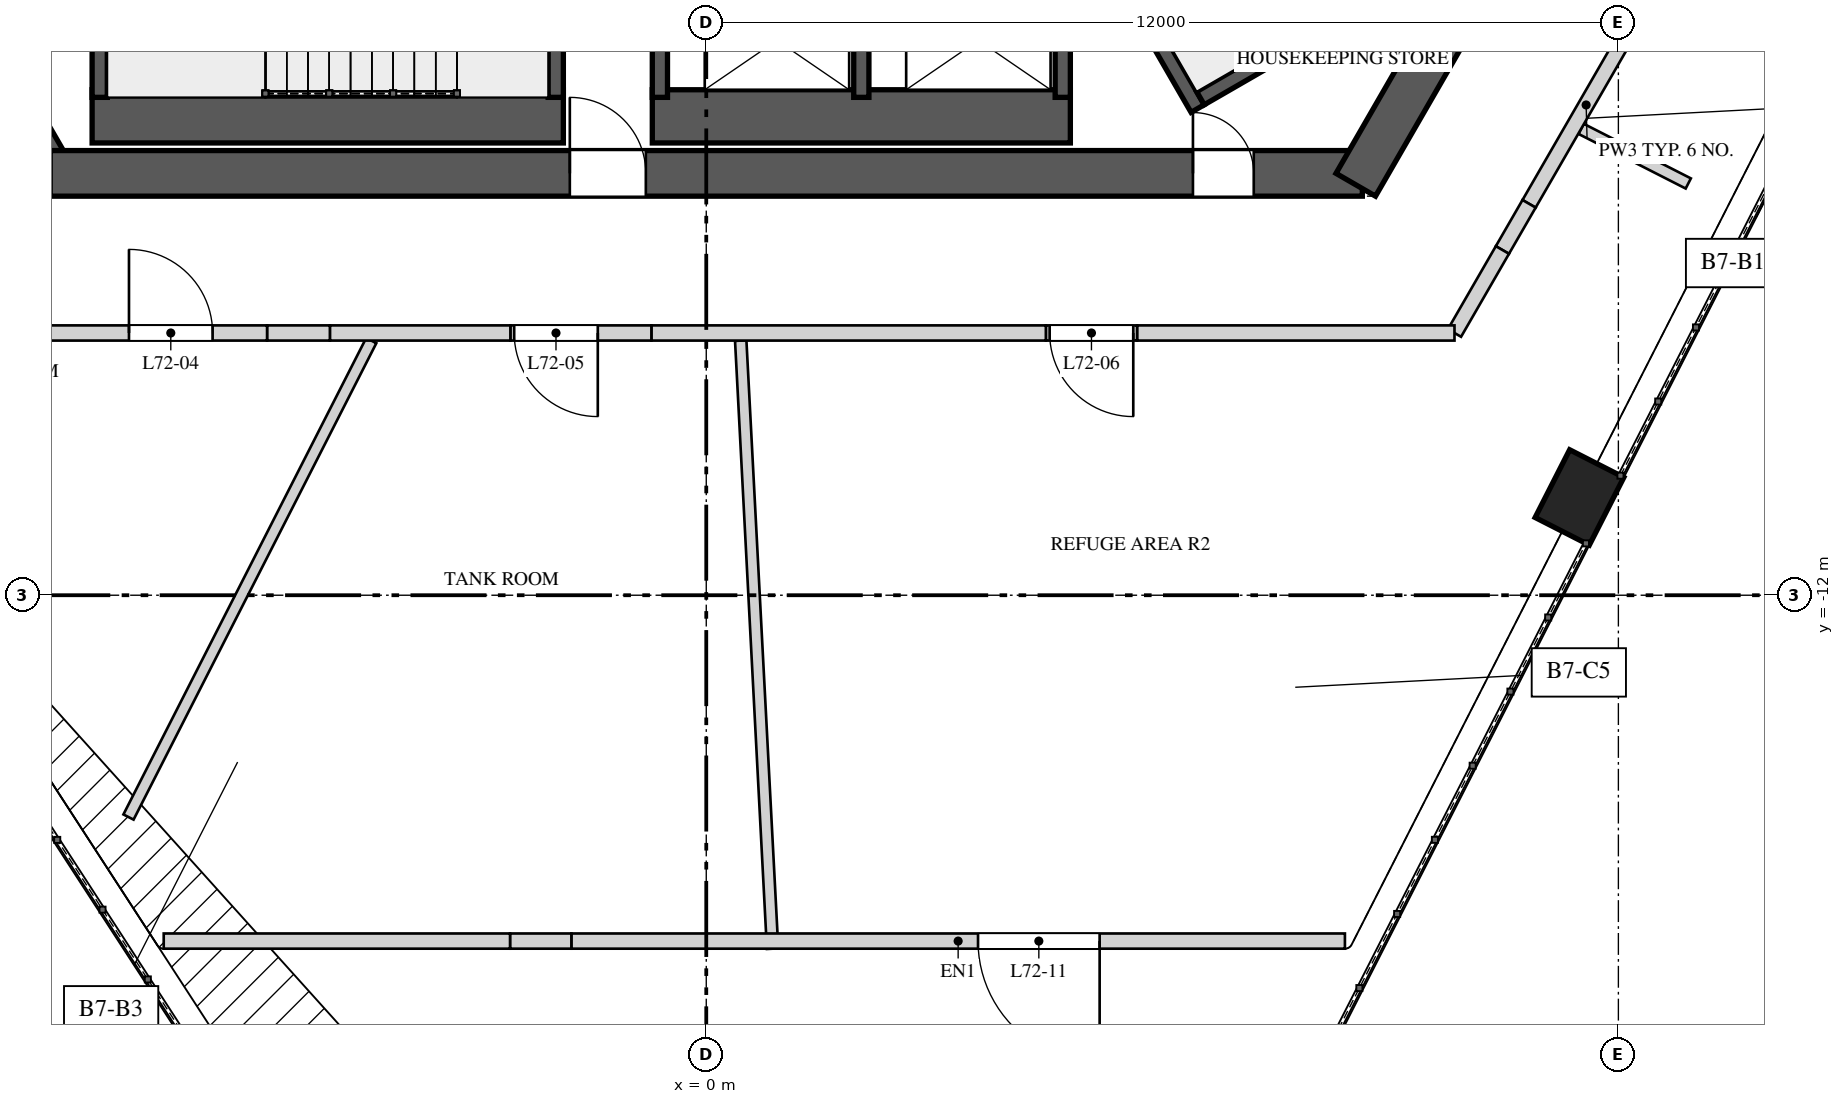
"""IFC4 building model, lengths in metres.
Left out: names, types, materials, properties, quantities, classifications, styles, units other than length and angle.
Written with IfcOpenShell. Run it as: python <this file> out.ifc"""

import sys

from ifc_helpers import new_model, si_unit, direction, frame, frame_2d, origin, origin_2d, place, context, subcontext, project, spatial, polyline, rectangle, outline, extrude, element, fill, save


model = new_model("IFC4")
c1 = context("Model", 3, precision=1e-05, world=origin(), true_north=direction((0.0, 1.0)))
c2 = subcontext(c1, "Body", "Model", "MODEL_VIEW")
j1 = project(units=[si_unit("LENGTHUNIT", "METRE"), si_unit("PLANEANGLEUNIT", "RADIAN")], contexts=[c1])
p1 = place(None, origin())
s1 = spatial("IfcSite", under=j1, at=p1, CompositionType="ELEMENT")
p2 = place(p1, origin())
s2 = spatial("IfcBuilding", under=s1, at=p2, CompositionType="ELEMENT")
p3 = place(p2, frame((0.0, 0.0, 306.4)))
s3 = spatial("IfcBuildingStorey", under=s2, at=p3, CompositionType="ELEMENT", Elevation=306.4)
p4 = place(p3, frame((-9.988, -4.1, 0.0), z_axis=(0.0, 0.0, 1.0), x_axis=(0.499995765644, -0.866027848477, 0.0)))
e1 = element("IfcWall", 1, at=p4, inside=s3, PredefinedType="SHEAR", context=c2, shape_type="SweptSolid", body=[
    extrude(rectangle(XDim=2.887, YDim=0.6, at=frame_2d((1.443, 0.0))), origin(), (0.0, 0.0, 1.0), 14.0),
])
p5 = place(p3, frame((-8.631, -6.45, 0.0), z_axis=(0.0, 0.0, 1.0), x_axis=(1.0, 0.0, 0.0)))
e2 = element("IfcWall", 2, at=p5, inside=s3, PredefinedType="SHEAR", context=c2, shape_type="SweptSolid", body=[
    extrude(rectangle(XDim=17.263, YDim=0.6, at=frame_2d((8.631, 0.0))), origin(), (0.0, 0.0, 1.0), 14.0),
])
p6 = place(p5, frame((6.836, 0.0, 0.0)))
e3 = element("IfcOpeningElement", 3, at=p6, cuts=e2, PredefinedType="OPENING", context=c2, shape_type="SweptSolid", body=[
    extrude(rectangle(XDim=1.0, YDim=2.4, at=frame_2d((0.5, 1.2))), frame((0.0, 0.31, 0.0), z_axis=(0.0, -1.0, 0.0), x_axis=(1.0, 0.0, 0.0)), (0.0, 0.0, 1.0), 0.62),
])
p7 = place(p5, frame((15.034, 0.0, 0.0)))
e4 = element("IfcOpeningElement", 4, at=p7, cuts=e2, PredefinedType="OPENING", context=c2, shape_type="SweptSolid", body=[
    extrude(rectangle(XDim=0.8, YDim=2.1, at=frame_2d((0.4, 1.05))), frame((0.0, 0.31, 0.0), z_axis=(0.0, -1.0, 0.0), x_axis=(1.0, 0.0, 0.0)), (0.0, 0.0, 1.0), 0.62),
])
p8 = place(p3, frame((8.545, -6.6, 0.0), z_axis=(0.0, 0.0, 1.0), x_axis=(0.499995765644, 0.866027848477, 0.0)))
e5 = element("IfcWall", 5, at=p8, inside=s3, PredefinedType="SHEAR", context=c2, shape_type="SweptSolid", body=[
    extrude(rectangle(XDim=2.887, YDim=0.6, at=frame_2d((1.443, 0.0))), origin(), (0.0, 0.0, 1.0), 14.0),
])
p9 = place(p3, frame((11.488, -10.713, 0.0), z_axis=(0.0, 0.0, 1.0), x_axis=(0.45399049974, 0.891006524188, 0.0)))
e6 = element("IfcColumn", 6, at=p9, inside=s3, PredefinedType="COLUMN", context=c2, shape_type="SweptSolid", body=[
    extrude(rectangle(XDim=1.0, YDim=0.8, at=origin_2d()), origin(), (0.0, 0.0, 1.0), 9.037),
])
p10 = place(p3, frame((-8.08, -5.7, 0.0), z_axis=(0.0, 0.0, 1.0), x_axis=(1.0, 0.0, 0.0)))
e7 = element("IfcWall", 7, at=p10, inside=s3, PredefinedType="SOLIDWALL", context=c2, shape_type="SweptSolid", body=[
    extrude(rectangle(XDim=6.2, YDim=0.7, at=frame_2d((3.1, 0.0))), origin(), (0.0, 0.0, 1.0), 13.65),
])
p11 = place(p3, frame((-7.98, -2.9, 0.0), z_axis=(0.0, 0.0, 1.0), x_axis=(0.0, -1.0, 0.0)))
e8 = element("IfcWall", 8, at=p11, inside=s3, PredefinedType="SOLIDWALL", context=c2, shape_type="SweptSolid", body=[
    extrude(rectangle(XDim=2.55, YDim=0.2, at=frame_2d((1.275, 0.0))), origin(), (0.0, 0.0, 1.0), 13.65),
])
p12 = place(p3, frame((-1.98, -2.9, 0.0), z_axis=(0.0, 0.0, 1.0), x_axis=(0.0, -1.0, 0.0)))
e9 = element("IfcWall", 9, at=p12, inside=s3, PredefinedType="SOLIDWALL", context=c2, shape_type="SweptSolid", body=[
    extrude(rectangle(XDim=2.55, YDim=0.2, at=frame_2d((1.275, 0.0))), origin(), (0.0, 0.0, 1.0), 13.65),
])
p13 = place(p12, frame((0.725, 0.0, 0.0)))
e10 = element("IfcOpeningElement", 10, at=p13, cuts=e9, PredefinedType="OPENING", context=c2, shape_type="SweptSolid", body=[
    extrude(rectangle(XDim=1.1, YDim=2.4, at=frame_2d((0.55, 1.2))), frame((0.0, 0.11, 0.0), z_axis=(0.0, -1.0, 0.0), x_axis=(1.0, 0.0, 0.0)), (0.0, 0.0, 1.0), 0.22),
])
p14 = place(p3, frame((6.465, -5.597, 0.0), z_axis=(0.0, 0.0, 1.0), x_axis=(-0.49998037582, 0.866036733513, 0.0)))
e11 = element("IfcWall", 11, at=p14, inside=s3, PredefinedType="SOLIDWALL", context=c2, shape_type="SweptSolid", body=[
    extrude(rectangle(XDim=6.2, YDim=0.2, at=frame_2d((3.1, 0.0))), origin(), (0.0, 0.0, 1.0), 13.65),
])
p15 = place(p3, frame((6.501, -5.461, 0.0), z_axis=(0.0, 0.0, 1.0), x_axis=(0.865989465428, 0.500062241894, 0.0)))
e12 = element("IfcWall", 12, at=p15, inside=s3, PredefinedType="SOLIDWALL", context=c2, shape_type="SweptSolid", body=[
    extrude(rectangle(XDim=2.55, YDim=0.2, at=frame_2d((1.275, 0.0))), origin(), (0.0, 0.0, 1.0), 13.65),
])
p16 = place(p3, frame((-0.71, -5.7, 0.0), z_axis=(0.0, 0.0, 1.0), x_axis=(1.0, 0.0, 0.0)))
e13 = element("IfcWall", 13, at=p16, inside=s3, PredefinedType="SOLIDWALL", context=c2, shape_type="SweptSolid", body=[
    extrude(rectangle(XDim=5.5, YDim=0.7, at=frame_2d((2.75, 0.0))), origin(), (0.0, 0.0, 1.0), 13.65),
])
for number, where, z_axis, x_axis in (
    (14, (-0.61, -3.9, 0.0), (0.0, 0.0, 1.0), (0.0, -1.0, 0.0)),
    (15, (2.04, -3.9, 0.0), (0.0, 0.0, 1.0), (0.0, -1.0, 0.0)),
    (16, (4.69, -3.9, 0.0), (0.0, 0.0, 1.0), (0.0, -1.0, 0.0)),
):
    element("IfcWall", number, at=place(p3, frame(where, z_axis=z_axis, x_axis=x_axis)), inside=s3, PredefinedType="SOLIDWALL", context=c2, shape_type="SweptSolid", body=[
        extrude(rectangle(XDim=1.55, YDim=0.2, at=frame_2d((0.775, 0.0))), origin(), (0.0, 0.0, 1.0), 13.65),
    ])
p17 = place(p3, frame((-4.407, -8.65, 0.0), z_axis=(0.0, 0.0, 1.0), x_axis=(-0.454002721832, -0.891000296615, 0.0)))
e17 = element("IfcWall", 17, at=p17, inside=s3, PredefinedType="PARTITIONING", context=c2, shape_type="SweptSolid", body=[
    extrude(rectangle(XDim=7.035, YDim=0.15, at=frame_2d((3.518, 0.0))), origin(), (0.0, 0.0, 1.0), 13.65),
])
p18 = place(p3, frame((0.453, -8.65, 0.0), z_axis=(0.0, 0.0, 1.0), x_axis=(0.052326895947, -0.998630009543, 0.0)))
e18 = element("IfcWall", 18, at=p18, inside=s3, PredefinedType="PARTITIONING", context=c2, shape_type="SweptSolid", body=[
    extrude(rectangle(XDim=8.011, YDim=0.15, at=frame_2d((4.005, 0.0))), origin(), (0.0, 0.0, 1.0), 13.65),
])
p19 = place(p3, frame((11.51, -5.865, 0.0), z_axis=(0.0, 0.0, 1.0), x_axis=(0.891006520779, -0.453990506431, 0.0)))
e19 = element("IfcWall", 19, at=p19, inside=s3, PredefinedType="PARTITIONING", context=c2, shape_type="SweptSolid", body=[
    extrude(rectangle(XDim=1.582, YDim=0.15, at=frame_2d((0.791, 0.0))), origin(), (0.0, 0.0, 1.0), 13.65),
])
p20 = place(p3, frame((12.326, -4.25, 0.0), z_axis=(0.0, 0.0, 1.0), x_axis=(-0.500003959331, -0.866023117852, 0.0)))
e20 = element("IfcWall", 20, at=p20, inside=s3, PredefinedType="SOLIDWALL", context=c2, shape_type="SweptSolid", body=[
    extrude(rectangle(XDim=3.003, YDim=0.2, at=frame_2d((1.501, 0.0))), origin(), (0.0, 0.0, 1.0), 13.65),
])
p21 = place(p3, frame((10.825, -6.851, 0.0), z_axis=(0.0, 0.0, 1.0), x_axis=(-0.500144223137, -0.865942120504, 0.0)))
e21 = element("IfcWall", 21, at=p21, inside=s3, PredefinedType="SOLIDWALL", context=c2, shape_type="SweptSolid", body=[
    extrude(rectangle(XDim=0.701, YDim=0.2, at=frame_2d((0.351, 0.0))), origin(), (0.0, 0.0, 1.0), 12.95),
])
p22 = place(p3, frame((10.474, -7.458, 0.0), z_axis=(0.0, 0.0, 1.0), x_axis=(-0.499929168788, -0.866066294342, 0.0)))
e22 = element("IfcWall", 22, at=p22, inside=s3, PredefinedType="SOLIDWALL", context=c2, shape_type="SweptSolid", body=[
    extrude(rectangle(XDim=1.261, YDim=0.2, at=frame_2d((0.63, 0.0))), origin(), (0.0, 0.0, 1.0), 13.65),
])
p23 = place(p3, frame((9.844, -8.55, 0.0), z_axis=(0.0, 0.0, 1.0), x_axis=(-1.0, 0.0, 0.0)))
e23 = element("IfcWall", 23, at=p23, inside=s3, PredefinedType="SOLIDWALL", context=c2, shape_type="SweptSolid", body=[
    extrude(rectangle(XDim=4.176, YDim=0.2, at=frame_2d((2.088, 0.0))), origin(), (0.0, 0.0, 1.0), 13.65),
])
p24 = place(p3, frame((5.668, -8.55, 0.0), z_axis=(0.0, 0.0, 1.0), x_axis=(-1.0, 0.0, 0.0)))
e24 = element("IfcWall", 24, at=p24, inside=s3, PredefinedType="SOLIDWALL", context=c2, shape_type="SweptSolid", body=[
    extrude(outline(polyline([(0.0, 0.0), (1.2, 0.0), (1.2, 13.65), (0.839, 13.65), (0.839, 12.95), (0.0, 12.95), (0.0, 0.0)])), frame((0.0, 0.1, 0.0), z_axis=(0.0, -1.0, 0.0), x_axis=(1.0, 0.0, 0.0)), (0.0, 0.0, 1.0), 0.2),
])
p25 = place(p24, frame((0.05, 0.0, 0.0)))
e25 = element("IfcOpeningElement", 25, at=p25, cuts=e24, PredefinedType="OPENING", context=c2, shape_type="SweptSolid", body=[
    extrude(rectangle(XDim=1.1, YDim=2.2, at=frame_2d((0.55, 1.1))), frame((0.0, 0.11, 0.0), z_axis=(0.0, -1.0, 0.0), x_axis=(1.0, 0.0, 0.0)), (0.0, 0.0, 1.0), 0.22),
])
p26 = place(p3, frame((4.468, -8.55, 0.0), z_axis=(0.0, 0.0, 1.0), x_axis=(-1.0, 0.0, 0.0)))
e26 = element("IfcWall", 26, at=p26, inside=s3, PredefinedType="SOLIDWALL", context=c2, shape_type="SweptSolid", body=[
    extrude(rectangle(XDim=5.189, YDim=0.2, at=frame_2d((2.595, 0.0))), origin(), (0.0, 0.0, 1.0), 13.65),
])
p27 = place(p3, frame((-0.722, -8.55, 0.0), z_axis=(0.0, 0.0, 1.0), x_axis=(-1.0, 0.0, 0.0)))
e27 = element("IfcWall", 27, at=p27, inside=s3, PredefinedType="SOLIDWALL", context=c2, shape_type="SweptSolid", body=[
    extrude(outline(polyline([(0.0, 0.0), (1.855, 0.0), (1.855, 13.65), (0.807, 13.65), (0.807, 12.75), (0.0, 12.75), (0.0, 0.0)])), frame((0.0, 0.1, 0.0), z_axis=(0.0, -1.0, 0.0), x_axis=(1.0, 0.0, 0.0)), (0.0, 0.0, 1.0), 0.2),
])
p28 = place(p27, frame((0.705, 0.0, 0.0)))
e28 = element("IfcOpeningElement", 28, at=p28, cuts=e27, PredefinedType="OPENING", context=c2, shape_type="SweptSolid", body=[
    extrude(rectangle(XDim=1.1, YDim=2.2, at=frame_2d((0.55, 1.1))), frame((0.0, 0.11, 0.0), z_axis=(0.0, -1.0, 0.0), x_axis=(1.0, 0.0, 0.0)), (0.0, 0.0, 1.0), 0.22),
])
p29 = place(p3, frame((-2.577, -8.55, 0.0), z_axis=(0.0, 0.0, 1.0), x_axis=(-1.0, 0.0, 0.0)))
e29 = element("IfcWall", 29, at=p29, inside=s3, PredefinedType="SOLIDWALL", context=c2, shape_type="SweptSolid", body=[
    extrude(rectangle(XDim=2.375, YDim=0.2, at=frame_2d((1.188, 0.0))), origin(), (0.0, 0.0, 1.0), 13.65),
])
p30 = place(p3, frame((-4.952, -8.55, 0.0), z_axis=(0.0, 0.0, 1.0), x_axis=(-1.0, 0.0, 0.0)))
e30 = element("IfcWall", 30, at=p30, inside=s3, PredefinedType="SOLIDWALL", context=c2, shape_type="SweptSolid", body=[
    extrude(rectangle(XDim=0.826, YDim=0.2, at=frame_2d((0.413, 0.0))), origin(), (0.0, 0.0, 1.0), 12.95),
])
p31 = place(p3, frame((-9.844, -8.55, 0.0), z_axis=(0.0, 0.0, 1.0), x_axis=(1.0, 0.0, 0.0)))
e31 = element("IfcWall", 31, at=p31, inside=s3, PredefinedType="SOLIDWALL", context=c2, shape_type="SweptSolid", body=[
    extrude(rectangle(XDim=4.066, YDim=0.2, at=frame_2d((2.033, 0.0))), origin(), (0.0, 0.0, 1.0), 13.65),
])
p32 = place(p31, frame((2.249, 0.0, 0.0)))
e32 = element("IfcOpeningElement", 32, at=p32, cuts=e31, PredefinedType="OPENING", context=c2, shape_type="SweptSolid", body=[
    extrude(rectangle(XDim=1.1, YDim=2.2, at=frame_2d((0.55, 1.1))), frame((0.0, 0.11, 0.0), z_axis=(0.0, -1.0, 0.0), x_axis=(1.0, 0.0, 0.0)), (0.0, 0.0, 1.0), 0.22),
])
p33 = place(p3, frame((8.402, -16.55, 0.0), z_axis=(0.0, 0.0, 1.0), x_axis=(-1.0, 0.0, 0.0)))
e33 = element("IfcWall", 33, at=p33, inside=s3, PredefinedType="SOLIDWALL", context=c2, shape_type="SweptSolid", body=[
    extrude(rectangle(XDim=10.177, YDim=0.2, at=frame_2d((5.088, 0.0))), origin(), (0.0, 0.0, 1.0), 13.65),
])
p34 = place(p33, frame((3.227, 0.0, 0.0)))
e34 = element("IfcOpeningElement", 34, at=p34, cuts=e33, PredefinedType="OPENING", context=c2, shape_type="SweptSolid", body=[
    extrude(rectangle(XDim=1.6, YDim=2.3, at=frame_2d((0.8, 1.15))), frame((0.0, 0.11, 0.0), z_axis=(0.0, -1.0, 0.0), x_axis=(1.0, 0.0, 0.0)), (0.0, 0.0, 1.0), 0.22),
])
p35 = place(p3, frame((-1.775, -16.55, 0.0), z_axis=(0.0, 0.0, 1.0), x_axis=(-1.0, 0.0, 0.0)))
e35 = element("IfcWall", 35, at=p35, inside=s3, PredefinedType="SOLIDWALL", context=c2, shape_type="SweptSolid", body=[
    extrude(rectangle(XDim=0.807, YDim=0.2, at=frame_2d((0.403, 0.0))), origin(), (0.0, 0.0, 1.0), 12.75),
])
p36 = place(p3, frame((-2.582, -16.55, 0.0), z_axis=(0.0, 0.0, 1.0), x_axis=(-1.0, 0.0, 0.0)))
e36 = element("IfcWall", 36, at=p36, inside=s3, PredefinedType="SOLIDWALL", context=c2, shape_type="SweptSolid", body=[
    extrude(rectangle(XDim=4.556, YDim=0.2, at=frame_2d((2.278, 0.0))), origin(), (0.0, 0.0, 1.0), 13.65),
])
p37 = place(p6, origin())
e37 = element("IfcDoor", 37, at=p37, inside=s3, OperationType="SINGLE_SWING_LEFT", PredefinedType="DOOR", context=c2, shape_type="SweptSolid", body=[
    extrude(rectangle(XDim=1.0, YDim=2.4, at=frame_2d((0.5, 1.2))), frame((0.0, 0.025, 0.0), z_axis=(0.0, -1.0, 0.0), x_axis=(1.0, 0.0, 0.0)), (0.0, 0.0, 1.0), 0.05),
])
fill(e3, e37)
p38 = place(p7, origin())
e38 = element("IfcDoor", 38, at=p38, inside=s3, OperationType="SINGLE_SWING_LEFT", PredefinedType="DOOR", context=c2, shape_type="SweptSolid", body=[
    extrude(rectangle(XDim=0.8, YDim=2.1, at=frame_2d((0.4, 1.05))), frame((0.0, 0.025, 0.0), z_axis=(0.0, -1.0, 0.0), x_axis=(1.0, 0.0, 0.0)), (0.0, 0.0, 1.0), 0.05),
])
fill(e4, e38)
p39 = place(p32, origin())
e39 = element("IfcDoor", 39, at=p39, inside=s3, OperationType="SINGLE_SWING_RIGHT", PredefinedType="DOOR", context=c2, shape_type="SweptSolid", body=[
    extrude(rectangle(XDim=1.1, YDim=2.2, at=frame_2d((0.55, 1.1))), frame((0.0, 0.025, 0.0), z_axis=(0.0, -1.0, 0.0), x_axis=(1.0, 0.0, 0.0)), (0.0, 0.0, 1.0), 0.05),
])
fill(e32, e39)
p40 = place(p28, origin())
e40 = element("IfcDoor", 40, at=p40, inside=s3, OperationType="SINGLE_SWING_LEFT", PredefinedType="DOOR", context=c2, shape_type="SweptSolid", body=[
    extrude(rectangle(XDim=1.1, YDim=2.2, at=frame_2d((0.55, 1.1))), frame((0.0, 0.025, 0.0), z_axis=(0.0, -1.0, 0.0), x_axis=(1.0, 0.0, 0.0)), (0.0, 0.0, 1.0), 0.05),
])
fill(e28, e40)
p41 = place(p25, origin())
e41 = element("IfcDoor", 41, at=p41, inside=s3, OperationType="SINGLE_SWING_RIGHT", PredefinedType="DOOR", context=c2, shape_type="SweptSolid", body=[
    extrude(rectangle(XDim=1.1, YDim=2.2, at=frame_2d((0.55, 1.1))), frame((0.0, 0.025, 0.0), z_axis=(0.0, -1.0, 0.0), x_axis=(1.0, 0.0, 0.0)), (0.0, 0.0, 1.0), 0.05),
])
fill(e25, e41)
p42 = place(p34, origin())
e42 = element("IfcDoor", 42, at=p42, inside=s3, OperationType="DOUBLE_DOOR_SINGLE_SWING", PredefinedType="DOOR", context=c2, shape_type="SweptSolid", body=[
    extrude(rectangle(XDim=1.6, YDim=2.3, at=frame_2d((0.8, 1.15))), frame((0.0, 0.025, 0.0), z_axis=(0.0, -1.0, 0.0), x_axis=(1.0, 0.0, 0.0)), (0.0, 0.0, 1.0), 0.05),
])
fill(e34, e42)
save(model, sys.argv[1])
